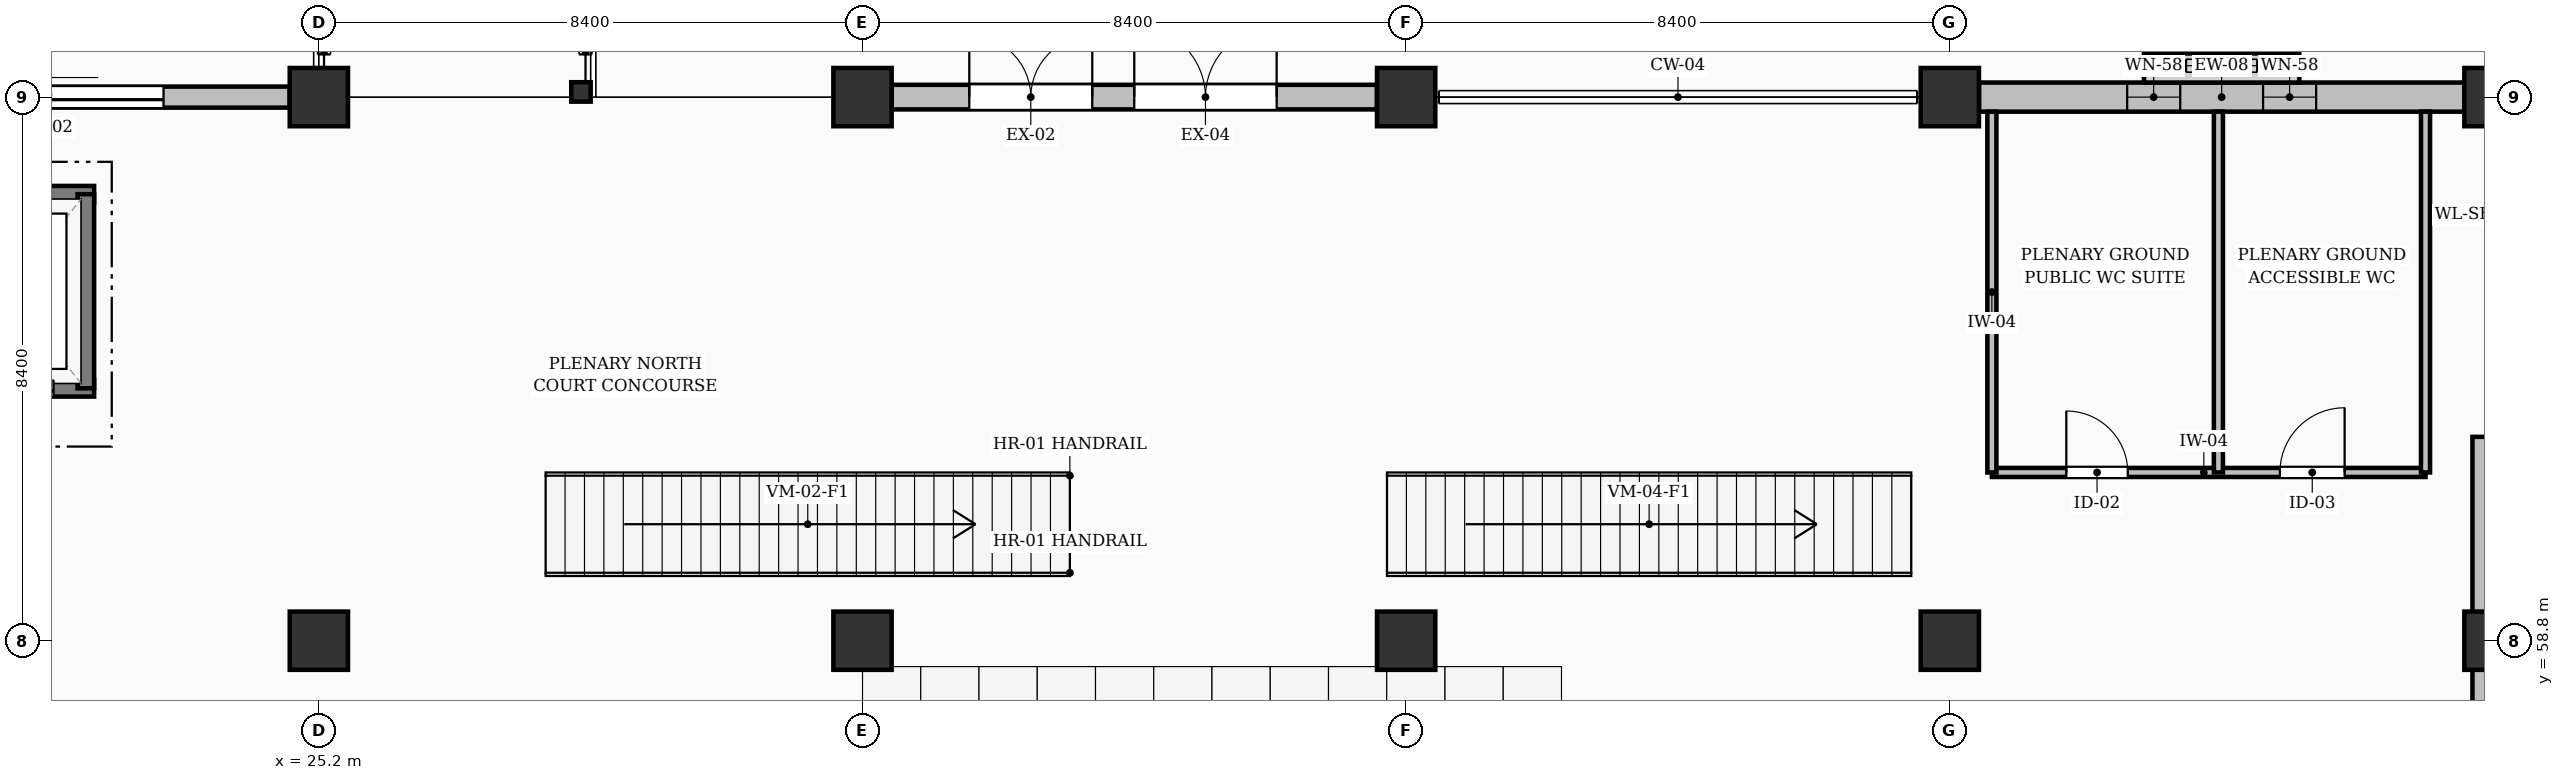
"""IFC4 building model, lengths in metres.
Left out: names, types, materials, properties, quantities, classifications, styles, units other than length and angle.
Written with IfcOpenShell. Run it as: python <this file> out.ifc"""

import sys

from ifc_helpers import new_model, si_unit, direction, frame, frame_2d, origin, origin_2d, place, context, subcontext, project, spatial, rectangle, hollow_rectangle, extrude, element, fill, save


model = new_model("IFC4")
c1 = context("Model", 3, precision=1e-05, world=origin(), true_north=direction((0.0, 1.0)))
c2 = subcontext(c1, "Body", "Model", "MODEL_VIEW")
j1 = project(units=[si_unit("LENGTHUNIT", "METRE"), si_unit("PLANEANGLEUNIT", "RADIAN")], contexts=[c1])
p1 = place(None, origin())
s1 = spatial("IfcSite", under=j1, at=p1, CompositionType="ELEMENT")
p2 = place(p1, origin())
s2 = spatial("IfcBuilding", under=s1, at=p2, CompositionType="ELEMENT")
p3 = place(p2, origin())
s3 = spatial("IfcBuildingStorey", under=s2, at=p3, CompositionType="ELEMENT", Elevation=0.0)
for number, where, z_axis, x_axis in (
    (1, (25.2, 58.8, 0.0), (0.0, 0.0, 1.0), (1.0, 0.0, 0.0)),
    (2, (25.2, 67.2, 0.0), (0.0, 0.0, 1.0), (1.0, 0.0, 0.0)),
    (3, (33.6, 58.8, 0.0), (0.0, 0.0, 1.0), (1.0, 0.0, 0.0)),
    (4, (33.6, 67.2, 0.0), (0.0, 0.0, 1.0), (1.0, 0.0, 0.0)),
    (5, (42.0, 58.8, 0.0), (0.0, 0.0, 1.0), (1.0, 0.0, 0.0)),
    (6, (42.0, 67.2, 0.0), (0.0, 0.0, 1.0), (1.0, 0.0, 0.0)),
    (7, (50.4, 58.8, 0.0), (0.0, 0.0, 1.0), (1.0, 0.0, 0.0)),
    (8, (50.4, 67.2, 0.0), (0.0, 0.0, 1.0), (1.0, 0.0, 0.0)),
    (9, (58.8, 58.8, 0.0), (0.0, 0.0, 1.0), (1.0, 0.0, 0.0)),
    (10, (58.8, 67.2, 0.0), (0.0, 0.0, 1.0), (1.0, 0.0, 0.0)),
):
    element("IfcColumn", number, at=place(p3, frame(where, z_axis=z_axis, x_axis=x_axis)), inside=s3, PredefinedType="COLUMN", context=c2, shape_type="SweptSolid", body=[
        extrude(rectangle(XDim=0.9, YDim=0.9, at=origin_2d()), origin(), (0.0, 0.0, 1.0), 3.92),
    ])
p4 = place(p3, frame((29.25, 67.28, 0.0), z_axis=(0.0, 0.0, 1.0), x_axis=(1.0, 0.0, 0.0)))
e11 = element("IfcColumn", 11, at=p4, inside=s3, PredefinedType="COLUMN", context=c2, shape_type="SweptSolid", body=[
    extrude(hollow_rectangle(XDim=0.3, YDim=0.3, WallThickness=0.016, at=origin_2d()), origin(), (0.0, 0.0, 1.0), 3.92),
])
p5 = place(p3, frame((17.251, 67.2, 0.0), z_axis=(0.0, 0.0, 1.0), x_axis=(1.0, 0.0, 0.0)))
e12 = element("IfcWall", 12, at=p5, inside=s3, PredefinedType="SOLIDWALL", context=c2, shape_type="SweptSolid", body=[
    extrude(rectangle(XDim=7.498, YDim=0.325, at=frame_2d((3.749, 0.0))), origin(), (0.0, 0.0, 1.0), 2.825),
])
p6 = place(p5, frame((1.949, 0.0, 0.0)))
e13 = element("IfcOpeningElement", 13, at=p6, cuts=e12, PredefinedType="OPENING", context=c2, shape_type="SweptSolid", body=[
    extrude(rectangle(XDim=3.6, YDim=2.4, at=frame_2d((1.8, 1.2))), frame((0.0, 0.172, 0.0), z_axis=(0.0, -1.0, 0.0), x_axis=(1.0, 0.0, 0.0)), (0.0, 0.0, 1.0), 0.345),
])
p7 = place(p3, frame((34.051, 67.2, 0.0), z_axis=(0.0, 0.0, 1.0), x_axis=(1.0, 0.0, 0.0)))
e14 = element("IfcWall", 14, at=p7, inside=s3, PredefinedType="SOLIDWALL", context=c2, shape_type="SweptSolid", body=[
    extrude(rectangle(XDim=7.498, YDim=0.38, at=frame_2d((3.749, 0.0))), origin(), (0.0, 0.0, 1.0), 2.825),
])
p8 = place(p7, frame((1.199, 0.0, 0.0)))
e15 = element("IfcOpeningElement", 15, at=p8, cuts=e14, PredefinedType="OPENING", context=c2, shape_type="SweptSolid", body=[
    extrude(rectangle(XDim=1.9, YDim=2.2, at=frame_2d((0.95, 1.1))), frame((0.0, 0.2, 0.0), z_axis=(0.0, -1.0, 0.0), x_axis=(1.0, 0.0, 0.0)), (0.0, 0.0, 1.0), 0.4),
])
p9 = place(p7, frame((3.748, 0.0, 0.0)))
e16 = element("IfcOpeningElement", 16, at=p9, cuts=e14, PredefinedType="OPENING", context=c2, shape_type="SweptSolid", body=[
    extrude(rectangle(XDim=2.2, YDim=2.4, at=frame_2d((1.1, 1.2))), frame((0.0, 0.2, 0.0), z_axis=(0.0, -1.0, 0.0), x_axis=(1.0, 0.0, 0.0)), (0.0, 0.0, 1.0), 0.4),
])
p10 = place(p3, frame((50.851, 67.2, 0.0), z_axis=(0.0, 0.0, 1.0), x_axis=(1.0, 0.0, 0.0)))
e17 = element("IfcWall", 17, at=p10, inside=s3, PredefinedType="SOLIDWALL", context=c2, shape_type="SweptSolid", body=[
    extrude(rectangle(XDim=7.498, YDim=0.45, at=frame_2d((3.749, 0.0))), origin(), (0.0, 0.0, 1.0), 2.825),
])
p11 = place(p10, frame((2.289, 0.0, 0.3)))
e18 = element("IfcOpeningElement", 18, at=p11, cuts=e17, PredefinedType="OPENING", context=c2, shape_type="SweptSolid", body=[
    extrude(rectangle(XDim=0.82, YDim=2.15, at=frame_2d((0.41, 1.075))), frame((0.0, 0.235, 0.0), z_axis=(0.0, -1.0, 0.0), x_axis=(1.0, 0.0, 0.0)), (0.0, 0.0, 1.0), 0.47),
])
p12 = place(p10, frame((4.389, 0.0, 0.3)))
e19 = element("IfcOpeningElement", 19, at=p12, cuts=e17, PredefinedType="OPENING", context=c2, shape_type="SweptSolid", body=[
    extrude(rectangle(XDim=0.82, YDim=2.15, at=frame_2d((0.41, 1.075))), frame((0.0, 0.235, 0.0), z_axis=(0.0, -1.0, 0.0), x_axis=(1.0, 0.0, 0.0)), (0.0, 0.0, 1.0), 0.47),
])
p13 = place(p3, frame((19.073, 62.7, 0.0), z_axis=(0.0, 0.0, 1.0), x_axis=(1.0, 0.0, 0.0)))
e20 = element("IfcWall", 20, at=p13, inside=s3, PredefinedType="SOLIDWALL", context=c2, shape_type="SweptSolid", body=[
    extrude(rectangle(XDim=2.655, YDim=0.255, at=frame_2d((1.328, 0.0))), origin(), (0.0, 0.0, 1.0), 3.64),
])
p14 = place(p13, frame((0.627, 0.0, 0.0)))
e21 = element("IfcOpeningElement", 21, at=p14, cuts=e20, PredefinedType="OPENING", context=c2, shape_type="SweptSolid", body=[
    extrude(rectangle(XDim=1.4, YDim=2.3, at=frame_2d((0.7, 1.15))), frame((0.0, 0.137, 0.0), z_axis=(0.0, -1.0, 0.0), x_axis=(1.0, 0.0, 0.0)), (0.0, 0.0, 1.0), 0.275),
])
p15 = place(p3, frame((19.073, 65.7, 0.0), z_axis=(0.0, 0.0, 1.0), x_axis=(1.0, 0.0, 0.0)))
e22 = element("IfcWall", 22, at=p15, inside=s3, PredefinedType="SOLIDWALL", context=c2, shape_type="SweptSolid", body=[
    extrude(rectangle(XDim=2.655, YDim=0.255, at=frame_2d((1.328, 0.0))), origin(), (0.0, 0.0, 1.0), 3.64),
])
p16 = place(p3, frame((21.6, 62.7, 0.0), z_axis=(0.0, 0.0, 1.0), x_axis=(0.0, 1.0, 0.0)))
e23 = element("IfcWall", 23, at=p16, inside=s3, PredefinedType="SOLIDWALL", context=c2, shape_type="SweptSolid", body=[
    extrude(rectangle(XDim=3.0, YDim=0.255, at=frame_2d((1.5, 0.0))), origin(), (0.0, 0.0, 1.0), 3.64),
])
p17 = place(p3, frame((58.6, 13.4, 0.0), z_axis=(0.0, 0.0, 1.0), x_axis=(0.0, 1.0, 0.0)))
e24 = element("IfcWall", 24, at=p17, inside=s3, PredefinedType="SOLIDWALL", context=c2, shape_type="SweptSolid", body=[
    extrude(rectangle(XDim=48.55, YDim=0.25, at=frame_2d((24.275, 0.0))), origin(), (0.0, 0.0, 1.0), 2.675),
])
p18 = place(p17, frame((6.8, 0.0, 0.0)))
e25 = element("IfcOpeningElement", 25, at=p18, cuts=e24, PredefinedType="OPENING", context=c2, shape_type="SweptSolid", body=[
    extrude(rectangle(XDim=1.85, YDim=2.35, at=frame_2d((0.925, 1.175))), frame((0.0, 0.135, 0.0), z_axis=(0.0, -1.0, 0.0), x_axis=(1.0, 0.0, 0.0)), (0.0, 0.0, 1.0), 0.27),
])
p19 = place(p17, frame((32.0, 0.0, 0.0)))
e26 = element("IfcOpeningElement", 26, at=p19, cuts=e24, PredefinedType="OPENING", context=c2, shape_type="SweptSolid", body=[
    extrude(rectangle(XDim=1.85, YDim=2.35, at=frame_2d((0.925, 1.175))), frame((0.0, 0.135, 0.0), z_axis=(0.0, -1.0, 0.0), x_axis=(1.0, 0.0, 0.0)), (0.0, 0.0, 1.0), 0.27),
])
p20 = place(p3, frame((51.05, 61.4, 0.0), z_axis=(0.0, 0.0, 1.0), x_axis=(1.0, 0.0, 0.0)))
e27 = element("IfcWall", 27, at=p20, inside=s3, PredefinedType="PARTITIONING", context=c2, shape_type="SweptSolid", body=[
    extrude(rectangle(XDim=6.7, YDim=0.14, at=frame_2d((3.35, 0.0))), origin(), (0.0, 0.0, 1.0), 3.64),
])
p21 = place(p20, frame((1.15, 0.0, 0.0)))
e28 = element("IfcOpeningElement", 28, at=p21, cuts=e27, PredefinedType="OPENING", context=c2, shape_type="SweptSolid", body=[
    extrude(rectangle(XDim=0.95, YDim=2.1, at=frame_2d((0.475, 1.05))), frame((0.0, 0.08, 0.0), z_axis=(0.0, -1.0, 0.0), x_axis=(1.0, 0.0, 0.0)), (0.0, 0.0, 1.0), 0.16),
])
p22 = place(p20, frame((4.45, 0.0, 0.0)))
e29 = element("IfcOpeningElement", 29, at=p22, cuts=e27, PredefinedType="OPENING", context=c2, shape_type="SweptSolid", body=[
    extrude(rectangle(XDim=1.0, YDim=2.1, at=frame_2d((0.5, 1.05))), frame((0.0, 0.08, 0.0), z_axis=(0.0, -1.0, 0.0), x_axis=(1.0, 0.0, 0.0)), (0.0, 0.0, 1.0), 0.16),
])
for number, where, z_axis, x_axis in (
    (30, (51.05, 61.4, 0.0), (0.0, 0.0, 1.0), (0.0, 1.0, 0.0)),
    (31, (54.55, 61.4, 0.0), (0.0, 0.0, 1.0), (0.0, 1.0, 0.0)),
    (32, (57.75, 61.4, 0.0), (0.0, 0.0, 1.0), (0.0, 1.0, 0.0)),
):
    element("IfcWall", number, at=place(p3, frame(where, z_axis=z_axis, x_axis=x_axis)), inside=s3, PredefinedType="PARTITIONING", context=c2, shape_type="SweptSolid", body=[
        extrude(rectangle(XDim=5.575, YDim=0.14, at=frame_2d((2.788, 0.0))), origin(), (0.0, 0.0, 1.0), 3.64),
    ])
p23 = place(p6, origin())
e33 = element("IfcDoor", 33, at=p23, inside=s3, OperationType="ROLLINGUP", PredefinedType="GATE", context=c2, shape_type="SweptSolid", body=[
    extrude(rectangle(XDim=3.6, YDim=2.4, at=frame_2d((1.8, 1.2))), frame((0.0, 0.025, 0.0), z_axis=(0.0, -1.0, 0.0), x_axis=(1.0, 0.0, 0.0)), (0.0, 0.0, 1.0), 0.05),
])
fill(e13, e33)
p24 = place(p8, origin())
e34 = element("IfcDoor", 34, at=p24, inside=s3, OperationType="DOUBLE_DOOR_SINGLE_SWING", PredefinedType="DOOR", context=c2, shape_type="SweptSolid", body=[
    extrude(rectangle(XDim=1.9, YDim=2.2, at=frame_2d((0.95, 1.1))), frame((0.0, 0.025, 0.0), z_axis=(0.0, -1.0, 0.0), x_axis=(1.0, 0.0, 0.0)), (0.0, 0.0, 1.0), 0.05),
])
fill(e15, e34)
p25 = place(p9, origin())
e35 = element("IfcDoor", 35, at=p25, inside=s3, OperationType="DOUBLE_DOOR_SINGLE_SWING", PredefinedType="DOOR", context=c2, shape_type="SweptSolid", body=[
    extrude(rectangle(XDim=2.2, YDim=2.4, at=frame_2d((1.1, 1.2))), frame((0.0, 0.025, 0.0), z_axis=(0.0, -1.0, 0.0), x_axis=(1.0, 0.0, 0.0)), (0.0, 0.0, 1.0), 0.05),
])
fill(e16, e35)
p26 = place(p11, origin())
e36 = element("IfcWindow", 36, at=p26, inside=s3, PartitioningType="SINGLE_PANEL", PredefinedType="WINDOW", context=c2, shape_type="SweptSolid", body=[
    extrude(rectangle(XDim=0.82, YDim=2.15, at=frame_2d((0.41, 1.075))), frame((0.0, 0.03, 0.0), z_axis=(0.0, -1.0, 0.0), x_axis=(1.0, 0.0, 0.0)), (0.0, 0.0, 1.0), 0.06),
])
fill(e18, e36)
p27 = place(p12, origin())
e37 = element("IfcWindow", 37, at=p27, inside=s3, PartitioningType="SINGLE_PANEL", PredefinedType="WINDOW", context=c2, shape_type="SweptSolid", body=[
    extrude(rectangle(XDim=0.82, YDim=2.15, at=frame_2d((0.41, 1.075))), frame((0.0, 0.03, 0.0), z_axis=(0.0, -1.0, 0.0), x_axis=(1.0, 0.0, 0.0)), (0.0, 0.0, 1.0), 0.06),
])
fill(e19, e37)
p28 = place(p14, origin())
e38 = element("IfcDoor", 38, at=p28, inside=s3, OperationType="DOUBLE_DOOR_SLIDING", PredefinedType="DOOR", context=c2, shape_type="SweptSolid", body=[
    extrude(rectangle(XDim=1.4, YDim=2.3, at=frame_2d((0.7, 1.15))), frame((0.0, 0.025, 0.0), z_axis=(0.0, -1.0, 0.0), x_axis=(1.0, 0.0, 0.0)), (0.0, 0.0, 1.0), 0.05),
])
fill(e21, e38)
p29 = place(p21, origin())
e39 = element("IfcDoor", 39, at=p29, inside=s3, OperationType="SINGLE_SWING_LEFT", PredefinedType="DOOR", context=c2, shape_type="SweptSolid", body=[
    extrude(rectangle(XDim=0.95, YDim=2.1, at=frame_2d((0.475, 1.05))), frame((0.0, 0.025, 0.0), z_axis=(0.0, -1.0, 0.0), x_axis=(1.0, 0.0, 0.0)), (0.0, 0.0, 1.0), 0.05),
])
fill(e28, e39)
p30 = place(p22, origin())
e40 = element("IfcDoor", 40, at=p30, inside=s3, OperationType="SINGLE_SWING_RIGHT", PredefinedType="DOOR", context=c2, shape_type="SweptSolid", body=[
    extrude(rectangle(XDim=1.0, YDim=2.1, at=frame_2d((0.5, 1.05))), frame((0.0, 0.025, 0.0), z_axis=(0.0, -1.0, 0.0), x_axis=(1.0, 0.0, 0.0)), (0.0, 0.0, 1.0), 0.05),
])
fill(e29, e40)
save(model, sys.argv[1])
